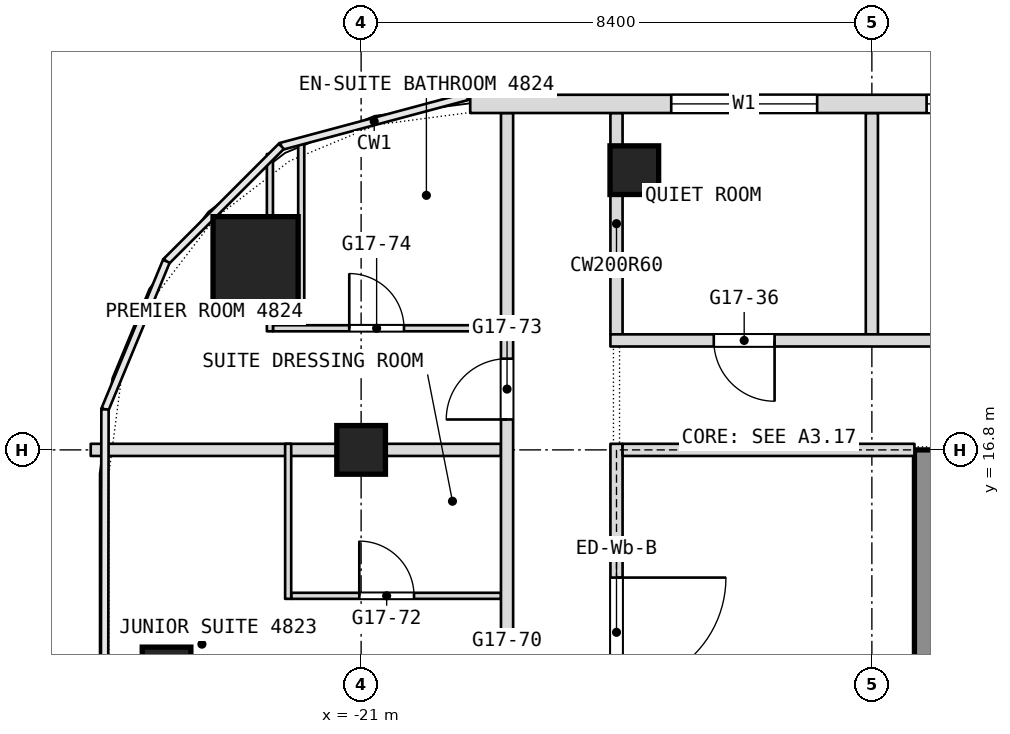
"""IFC4 building model, lengths in metres.
Left out: names, types, materials, properties, quantities, classifications, styles, units other than length and angle.
Written with IfcOpenShell. Run it as: python <this file> out.ifc"""

import sys

from ifc_helpers import new_model, si_unit, direction, frame, frame_2d, origin, origin_2d, place, context, subcontext, project, spatial, rectangle, extrude, element, fill, save


model = new_model("IFC4")
c1 = context("Model", 3, precision=1e-05, world=origin(), true_north=direction((0.0, 1.0)))
c2 = subcontext(c1, "Body", "Model", "MODEL_VIEW")
j1 = project(units=[si_unit("LENGTHUNIT", "METRE"), si_unit("PLANEANGLEUNIT", "RADIAN")], contexts=[c1])
p1 = place(None, origin())
s1 = spatial("IfcSite", under=j1, at=p1, CompositionType="ELEMENT")
p2 = place(p1, origin())
s2 = spatial("IfcBuilding", under=s1, at=p2, CompositionType="ELEMENT")
p3 = place(p2, frame((0.0, 0.0, 209.3)))
s3 = spatial("IfcBuildingStorey", under=s2, at=p3, CompositionType="ELEMENT", Elevation=209.3)
p4 = place(p3, frame((-11.5, 0.0, 0.0), z_axis=(0.0, 0.0, 1.0), x_axis=(0.0, 1.0, 0.0)))
e1 = element("IfcWall", 1, at=p4, inside=s3, PredefinedType="SHEAR", context=c2, shape_type="SweptSolid", body=[
    extrude(rectangle(XDim=16.8, YDim=0.8, at=frame_2d((8.4, 0.0))), origin(), (0.0, 0.0, 1.0), 3.6),
])
p5 = place(p4, frame((1.762, 0.0, 0.0)))
e2 = element("IfcOpeningElement", 2, at=p5, cuts=e1, PredefinedType="OPENING", context=c2, shape_type="SweptSolid", body=[
    extrude(rectangle(XDim=0.9, YDim=2.1, at=frame_2d((0.45, 1.05))), frame((0.0, 0.4, 0.0), z_axis=(0.0, -1.0, 0.0), x_axis=(1.0, 0.0, 0.0)), (0.0, 0.0, 1.0), 0.8),
])
p6 = place(p4, frame((4.387, 0.0, 0.0)))
e3 = element("IfcOpeningElement", 3, at=p6, cuts=e1, PredefinedType="OPENING", context=c2, shape_type="SweptSolid", body=[
    extrude(rectangle(XDim=0.9, YDim=2.1, at=frame_2d((0.45, 1.05))), frame((0.0, 0.4, 0.0), z_axis=(0.0, -1.0, 0.0), x_axis=(1.0, 0.0, 0.0)), (0.0, 0.0, 1.0), 0.8),
])
p7 = place(p4, frame((6.825, 0.0, 0.0)))
e4 = element("IfcOpeningElement", 4, at=p7, cuts=e1, PredefinedType="OPENING", context=c2, shape_type="SweptSolid", body=[
    extrude(rectangle(XDim=1.2, YDim=2.1, at=frame_2d((0.6, 1.05))), frame((0.0, 0.4, 0.0), z_axis=(0.0, -1.0, 0.0), x_axis=(1.0, 0.0, 0.0)), (0.0, 0.0, 1.0), 0.8),
])
p8 = place(p4, frame((12.3, 0.0, 0.0)))
e5 = element("IfcOpeningElement", 5, at=p8, cuts=e1, PredefinedType="OPENING", context=c2, shape_type="SweptSolid", body=[
    extrude(rectangle(XDim=0.9, YDim=2.1, at=frame_2d((0.45, 1.05))), frame((0.0, 0.4, 0.0), z_axis=(0.0, -1.0, 0.0), x_axis=(1.0, 0.0, 0.0)), (0.0, 0.0, 1.0), 0.8),
])
p9 = place(p4, frame((8.775, 0.0, 0.0)))
e6 = element("IfcOpeningElement", 6, at=p9, cuts=e1, PredefinedType="OPENING", context=c2, shape_type="SweptSolid", body=[
    extrude(rectangle(XDim=1.2, YDim=2.1, at=frame_2d((0.6, 1.05))), frame((0.0, 0.4, 0.0), z_axis=(0.0, -1.0, 0.0), x_axis=(1.0, 0.0, 0.0)), (0.0, 0.0, 1.0), 0.8),
])
p10 = place(p3, frame((-22.736, 19.936, 0.0), z_axis=(0.0, 0.0, 1.0), x_axis=(1.0, 0.0, 0.0)))
e7 = element("IfcColumn", 7, at=p10, inside=s3, PredefinedType="COLUMN", context=c2, shape_type="SweptSolid", body=[
    extrude(rectangle(XDim=1.4, YDim=1.4, at=origin_2d()), origin(), (0.0, 0.0, 1.0), 3.6),
])
for number, where, z_axis, x_axis in (
    (8, (-21.0, 16.8, 0.0), (0.0, 0.0, 1.0), (1.0, 0.0, 0.0)),
    (9, (-24.2, 13.156, 0.0), (0.0, 0.0, 1.0), (1.0, 0.0, 0.0)),
    (10, (-16.507, 21.4, 0.0), (0.0, 0.0, 1.0), (1.0, 0.0, 0.0)),
):
    element("IfcColumn", number, at=place(p3, frame(where, z_axis=z_axis, x_axis=x_axis)), inside=s3, PredefinedType="COLUMN", context=c2, shape_type="SweptSolid", body=[
        extrude(rectangle(XDim=0.8, YDim=0.8, at=origin_2d()), origin(), (0.0, 0.0, 1.0), 3.6),
    ])
p11 = place(p3, frame((-12.6, 18.7, 0.0), z_axis=(0.0, 0.0, 1.0), x_axis=(0.0, 1.0, 0.0)))
e11 = element("IfcWall", 11, at=p11, inside=s3, PredefinedType="PARTITIONING", context=c2, shape_type="SweptSolid", body=[
    extrude(rectangle(XDim=3.64, YDim=0.2, at=frame_2d((1.82, 0.0))), origin(), (0.0, 0.0, 1.0), 3.34),
])
p12 = place(p3, frame((-22.15, 14.4, 0.0), z_axis=(0.0, 0.0, 1.0), x_axis=(1.0, 0.0, 0.0)))
e12 = element("IfcWall", 12, at=p12, inside=s3, PredefinedType="PARTITIONING", context=c2, shape_type="SweptSolid", body=[
    extrude(rectangle(XDim=3.45, YDim=0.1, at=frame_2d((1.725, 0.0))), origin(), (0.0, 0.0, 1.0), 3.34),
])
p13 = place(p12, frame((1.12, 0.0, 0.0)))
e13 = element("IfcOpeningElement", 13, at=p13, cuts=e12, PredefinedType="OPENING", context=c2, shape_type="SweptSolid", body=[
    extrude(rectangle(XDim=0.9, YDim=2.1, at=frame_2d((0.45, 1.05))), frame((0.0, 0.05, 0.0), z_axis=(0.0, -1.0, 0.0), x_axis=(1.0, 0.0, 0.0)), (0.0, 0.0, 1.0), 0.1),
])
p14 = place(p3, frame((-16.8, 18.7, 0.0), z_axis=(0.0, 0.0, 1.0), x_axis=(0.0, 1.0, 0.0)))
e14 = element("IfcWall", 14, at=p14, inside=s3, PredefinedType="PARTITIONING", context=c2, shape_type="SweptSolid", body=[
    extrude(rectangle(XDim=3.64, YDim=0.2, at=frame_2d((1.82, 0.0))), origin(), (0.0, 0.0, 1.0), 3.34),
])
p15 = place(p3, frame((-25.447, 16.8, 0.0), z_axis=(0.0, 0.0, 1.0), x_axis=(1.0, 0.0, 0.0)))
e15 = element("IfcWall", 15, at=p15, inside=s3, PredefinedType="PARTITIONING", context=c2, shape_type="SweptSolid", body=[
    extrude(rectangle(XDim=6.747, YDim=0.2, at=frame_2d((3.374, 0.0))), origin(), (0.0, 0.0, 1.0), 2.94),
])
p16 = place(p3, frame((-18.6, -26.751, 0.0), z_axis=(0.0, 0.0, 1.0), x_axis=(0.0, 1.0, 0.0)))
e16 = element("IfcWall", 16, at=p16, inside=s3, PredefinedType="PARTITIONING", context=c2, shape_type="SweptSolid", body=[
    extrude(rectangle(XDim=49.091, YDim=0.2, at=frame_2d((24.545, 0.0))), origin(), (0.0, 0.0, 1.0), 3.34),
])
p17 = place(p16, frame((3.413, 0.0, 0.0)))
e17 = element("IfcOpeningElement", 17, at=p17, cuts=e16, PredefinedType="OPENING", context=c2, shape_type="SweptSolid", body=[
    extrude(rectangle(XDim=1.0, YDim=2.1, at=frame_2d((0.5, 1.05))), frame((0.0, 0.1, 0.0), z_axis=(0.0, -1.0, 0.0), x_axis=(1.0, 0.0, 0.0)), (0.0, 0.0, 1.0), 0.2),
])
p18 = place(p16, frame((5.838, 0.0, 0.0)))
e18 = element("IfcOpeningElement", 18, at=p18, cuts=e16, PredefinedType="OPENING", context=c2, shape_type="SweptSolid", body=[
    extrude(rectangle(XDim=1.0, YDim=2.1, at=frame_2d((0.5, 1.05))), frame((0.0, 0.1, 0.0), z_axis=(0.0, -1.0, 0.0), x_axis=(1.0, 0.0, 0.0)), (0.0, 0.0, 1.0), 0.2),
])
p19 = place(p16, frame((13.551, 0.0, 0.0)))
e19 = element("IfcOpeningElement", 19, at=p19, cuts=e16, PredefinedType="OPENING", context=c2, shape_type="SweptSolid", body=[
    extrude(rectangle(XDim=1.1, YDim=2.1, at=frame_2d((0.55, 1.05))), frame((0.0, 0.1, 0.0), z_axis=(0.0, -1.0, 0.0), x_axis=(1.0, 0.0, 0.0)), (0.0, 0.0, 1.0), 0.2),
])
p20 = place(p16, frame((21.151, 0.0, 0.0)))
e20 = element("IfcOpeningElement", 20, at=p20, cuts=e16, PredefinedType="OPENING", context=c2, shape_type="SweptSolid", body=[
    extrude(rectangle(XDim=1.0, YDim=2.1, at=frame_2d((0.5, 1.05))), frame((0.0, 0.1, 0.0), z_axis=(0.0, -1.0, 0.0), x_axis=(1.0, 0.0, 0.0)), (0.0, 0.0, 1.0), 0.2),
])
p21 = place(p16, frame((22.951, 0.0, 0.0)))
e21 = element("IfcOpeningElement", 21, at=p21, cuts=e16, PredefinedType="OPENING", context=c2, shape_type="SweptSolid", body=[
    extrude(rectangle(XDim=1.0, YDim=2.1, at=frame_2d((0.5, 1.05))), frame((0.0, 0.1, 0.0), z_axis=(0.0, -1.0, 0.0), x_axis=(1.0, 0.0, 0.0)), (0.0, 0.0, 1.0), 0.2),
])
p22 = place(p16, frame((28.301, 0.0, 0.0)))
e22 = element("IfcOpeningElement", 22, at=p22, cuts=e16, PredefinedType="OPENING", context=c2, shape_type="SweptSolid", body=[
    extrude(rectangle(XDim=1.1, YDim=2.1, at=frame_2d((0.55, 1.05))), frame((0.0, 0.1, 0.0), z_axis=(0.0, -1.0, 0.0), x_axis=(1.0, 0.0, 0.0)), (0.0, 0.0, 1.0), 0.2),
])
p23 = place(p16, frame((38.851, 0.0, 0.0)))
e23 = element("IfcOpeningElement", 23, at=p23, cuts=e16, PredefinedType="OPENING", context=c2, shape_type="SweptSolid", body=[
    extrude(rectangle(XDim=1.1, YDim=2.1, at=frame_2d((0.55, 1.05))), frame((0.0, 0.1, 0.0), z_axis=(0.0, -1.0, 0.0), x_axis=(1.0, 0.0, 0.0)), (0.0, 0.0, 1.0), 0.2),
])
p24 = place(p16, frame((44.051, 0.0, 0.0)))
e24 = element("IfcOpeningElement", 24, at=p24, cuts=e16, PredefinedType="OPENING", context=c2, shape_type="SweptSolid", body=[
    extrude(rectangle(XDim=1.0, YDim=2.1, at=frame_2d((0.5, 1.05))), frame((0.0, 0.1, 0.0), z_axis=(0.0, -1.0, 0.0), x_axis=(1.0, 0.0, 0.0)), (0.0, 0.0, 1.0), 0.2),
])
p25 = place(p3, frame((-16.9, 18.6, 0.0), z_axis=(0.0, 0.0, 1.0), x_axis=(1.0, 0.0, 0.0)))
e25 = element("IfcWall", 25, at=p25, inside=s3, PredefinedType="PARTITIONING", context=c2, shape_type="SweptSolid", body=[
    extrude(rectangle(XDim=33.8, YDim=0.2, at=frame_2d((16.9, 0.0))), origin(), (0.0, 0.0, 1.0), 3.34),
])
p26 = place(p25, frame((1.7, 0.0, 0.0)))
e26 = element("IfcOpeningElement", 26, at=p26, cuts=e25, PredefinedType="OPENING", context=c2, shape_type="SweptSolid", body=[
    extrude(rectangle(XDim=1.0, YDim=2.1, at=frame_2d((0.5, 1.05))), frame((0.0, 0.1, 0.0), z_axis=(0.0, -1.0, 0.0), x_axis=(1.0, 0.0, 0.0)), (0.0, 0.0, 1.0), 0.2),
])
p27 = place(p25, frame((7.6, 0.0, 0.0)))
e27 = element("IfcOpeningElement", 27, at=p27, cuts=e25, PredefinedType="OPENING", context=c2, shape_type="SweptSolid", body=[
    extrude(rectangle(XDim=1.8, YDim=2.1, at=frame_2d((0.9, 1.05))), frame((0.0, 0.1, 0.0), z_axis=(0.0, -1.0, 0.0), x_axis=(1.0, 0.0, 0.0)), (0.0, 0.0, 1.0), 0.2),
])
p28 = place(p25, frame((16.0, 0.0, 0.0)))
e28 = element("IfcOpeningElement", 28, at=p28, cuts=e25, PredefinedType="OPENING", context=c2, shape_type="SweptSolid", body=[
    extrude(rectangle(XDim=1.8, YDim=2.1, at=frame_2d((0.9, 1.05))), frame((0.0, 0.1, 0.0), z_axis=(0.0, -1.0, 0.0), x_axis=(1.0, 0.0, 0.0)), (0.0, 0.0, 1.0), 0.2),
])
p29 = place(p25, frame((24.4, 0.0, 0.0)))
e29 = element("IfcOpeningElement", 29, at=p29, cuts=e25, PredefinedType="OPENING", context=c2, shape_type="SweptSolid", body=[
    extrude(rectangle(XDim=1.8, YDim=2.1, at=frame_2d((0.9, 1.05))), frame((0.0, 0.1, 0.0), z_axis=(0.0, -1.0, 0.0), x_axis=(1.0, 0.0, 0.0)), (0.0, 0.0, 1.0), 0.2),
])
p30 = place(p25, frame((31.1, 0.0, 0.0)))
e30 = element("IfcOpeningElement", 30, at=p30, cuts=e25, PredefinedType="OPENING", context=c2, shape_type="SweptSolid", body=[
    extrude(rectangle(XDim=1.0, YDim=2.1, at=frame_2d((0.5, 1.05))), frame((0.0, 0.1, 0.0), z_axis=(0.0, -1.0, 0.0), x_axis=(1.0, 0.0, 0.0)), (0.0, 0.0, 1.0), 0.2),
])
p31 = place(p3, frame((-22.45, 18.8, 0.0), z_axis=(0.0, 0.0, 1.0), x_axis=(1.0, 0.0, 0.0)))
e31 = element("IfcWall", 31, at=p31, inside=s3, PredefinedType="PARTITIONING", context=c2, shape_type="SweptSolid", body=[
    extrude(rectangle(XDim=3.75, YDim=0.1, at=frame_2d((1.875, 0.0))), origin(), (0.0, 0.0, 1.0), 3.34),
])
p32 = place(p31, frame((1.255, 0.0, 0.0)))
e32 = element("IfcOpeningElement", 32, at=p32, cuts=e31, PredefinedType="OPENING", context=c2, shape_type="SweptSolid", body=[
    extrude(rectangle(XDim=0.9, YDim=2.1, at=frame_2d((0.45, 1.05))), frame((0.0, 0.05, 0.0), z_axis=(0.0, -1.0, 0.0), x_axis=(1.0, 0.0, 0.0)), (0.0, 0.0, 1.0), 0.1),
])
p33 = place(p3, frame((-22.2, 14.35, 0.0), z_axis=(0.0, 0.0, 1.0), x_axis=(0.0, 1.0, 0.0)))
e33 = element("IfcWall", 33, at=p33, inside=s3, PredefinedType="PARTITIONING", context=c2, shape_type="SweptSolid", body=[
    extrude(rectangle(XDim=2.55, YDim=0.1, at=frame_2d((1.275, 0.0))), origin(), (0.0, 0.0, 1.0), 3.34),
])
p34 = place(p3, frame((-22.5, 18.75, 0.0), z_axis=(0.0, 0.0, 1.0), x_axis=(0.0, 1.0, 0.0)))
e34 = element("IfcWall", 34, at=p34, inside=s3, PredefinedType="PARTITIONING", context=c2, shape_type="SweptSolid", body=[
    extrude(rectangle(XDim=0.486, YDim=0.1, at=frame_2d((0.243, 0.0))), origin(), (0.0, 0.0, 1.0), 3.34),
])
p35 = place(p3, frame((-22.5, 20.636, 0.0), z_axis=(0.0, 0.0, 1.0), x_axis=(0.0, 1.0, 0.0)))
e35 = element("IfcWall", 35, at=p35, inside=s3, PredefinedType="PARTITIONING", context=c2, shape_type="SweptSolid", body=[
    extrude(rectangle(XDim=1.03, YDim=0.1, at=frame_2d((0.515, 0.0))), origin(), (0.0, 0.0, 1.0), 3.34),
])
p36 = place(p3, frame((-21.985, 19.236, 0.0), z_axis=(0.0, 0.0, 1.0), x_axis=(0.0, 1.0, 0.0)))
e36 = element("IfcWall", 36, at=p36, inside=s3, PredefinedType="PARTITIONING", context=c2, shape_type="SweptSolid", body=[
    extrude(rectangle(XDim=2.614, YDim=0.1, at=frame_2d((1.307, 0.0))), origin(), (0.0, 0.0, 1.0), 3.34),
])
p37 = place(p3, frame((19.206, 22.49, 0.0), z_axis=(0.0, 0.0, 1.0), x_axis=(-1.0, 0.0, 0.0)))
e37 = element("IfcWall", 37, at=p37, inside=s3, PredefinedType="NOTDEFINED", context=c2, shape_type="SweptSolid", body=[
    extrude(rectangle(XDim=38.412, YDim=0.3, at=frame_2d((19.206, 0.0))), origin(), (0.0, 0.0, 1.0), 3.6),
])
p38 = place(p37, frame((3.306, 0.0, 0.9)))
e38 = element("IfcOpeningElement", 38, at=p38, cuts=e37, PredefinedType="OPENING", context=c2, shape_type="SweptSolid", body=[
    extrude(rectangle(XDim=2.4, YDim=2.1, at=frame_2d((1.2, 1.05))), frame((0.0, 0.15, 0.0), z_axis=(0.0, -1.0, 0.0), x_axis=(1.0, 0.0, 0.0)), (0.0, 0.0, 1.0), 0.3),
])
p39 = place(p37, frame((7.506, 0.0, 0.9)))
e39 = element("IfcOpeningElement", 39, at=p39, cuts=e37, PredefinedType="OPENING", context=c2, shape_type="SweptSolid", body=[
    extrude(rectangle(XDim=2.4, YDim=2.1, at=frame_2d((1.2, 1.05))), frame((0.0, 0.15, 0.0), z_axis=(0.0, -1.0, 0.0), x_axis=(1.0, 0.0, 0.0)), (0.0, 0.0, 1.0), 0.3),
])
p40 = place(p37, frame((11.706, 0.0, 0.9)))
e40 = element("IfcOpeningElement", 40, at=p40, cuts=e37, PredefinedType="OPENING", context=c2, shape_type="SweptSolid", body=[
    extrude(rectangle(XDim=2.4, YDim=2.1, at=frame_2d((1.2, 1.05))), frame((0.0, 0.15, 0.0), z_axis=(0.0, -1.0, 0.0), x_axis=(1.0, 0.0, 0.0)), (0.0, 0.0, 1.0), 0.3),
])
p41 = place(p37, frame((15.906, 0.0, 0.9)))
e41 = element("IfcOpeningElement", 41, at=p41, cuts=e37, PredefinedType="OPENING", context=c2, shape_type="SweptSolid", body=[
    extrude(rectangle(XDim=2.4, YDim=2.1, at=frame_2d((1.2, 1.05))), frame((0.0, 0.15, 0.0), z_axis=(0.0, -1.0, 0.0), x_axis=(1.0, 0.0, 0.0)), (0.0, 0.0, 1.0), 0.3),
])
p42 = place(p37, frame((20.106, 0.0, 0.9)))
e42 = element("IfcOpeningElement", 42, at=p42, cuts=e37, PredefinedType="OPENING", context=c2, shape_type="SweptSolid", body=[
    extrude(rectangle(XDim=2.4, YDim=2.1, at=frame_2d((1.2, 1.05))), frame((0.0, 0.15, 0.0), z_axis=(0.0, -1.0, 0.0), x_axis=(1.0, 0.0, 0.0)), (0.0, 0.0, 1.0), 0.3),
])
p43 = place(p37, frame((24.306, 0.0, 0.9)))
e43 = element("IfcOpeningElement", 43, at=p43, cuts=e37, PredefinedType="OPENING", context=c2, shape_type="SweptSolid", body=[
    extrude(rectangle(XDim=2.4, YDim=2.1, at=frame_2d((1.2, 1.05))), frame((0.0, 0.15, 0.0), z_axis=(0.0, -1.0, 0.0), x_axis=(1.0, 0.0, 0.0)), (0.0, 0.0, 1.0), 0.3),
])
p44 = place(p37, frame((28.506, 0.0, 0.9)))
e44 = element("IfcOpeningElement", 44, at=p44, cuts=e37, PredefinedType="OPENING", context=c2, shape_type="SweptSolid", body=[
    extrude(rectangle(XDim=2.4, YDim=2.1, at=frame_2d((1.2, 1.05))), frame((0.0, 0.15, 0.0), z_axis=(0.0, -1.0, 0.0), x_axis=(1.0, 0.0, 0.0)), (0.0, 0.0, 1.0), 0.3),
])
p45 = place(p37, frame((32.706, 0.0, 0.9)))
e45 = element("IfcOpeningElement", 45, at=p45, cuts=e37, PredefinedType="OPENING", context=c2, shape_type="SweptSolid", body=[
    extrude(rectangle(XDim=2.4, YDim=2.1, at=frame_2d((1.2, 1.05))), frame((0.0, 0.15, 0.0), z_axis=(0.0, -1.0, 0.0), x_axis=(1.0, 0.0, 0.0)), (0.0, 0.0, 1.0), 0.3),
])
p46 = place(p3, frame((-16.8, -0.1, 0.0), z_axis=(0.0, 0.0, 1.0), x_axis=(0.0, 1.0, 0.0)))
e46 = element("IfcWall", 46, at=p46, inside=s3, PredefinedType="PARTITIONING", context=c2, shape_type="SweptSolid", body=[
    extrude(rectangle(XDim=17.0, YDim=0.2, at=frame_2d((8.5, 0.0))), origin(), (0.0, 0.0, 1.0), 3.34),
])
p47 = place(p46, frame((2.2, 0.0, 0.0)))
e47 = element("IfcOpeningElement", 47, at=p47, cuts=e46, PredefinedType="OPENING", context=c2, shape_type="SweptSolid", body=[
    extrude(rectangle(XDim=1.8, YDim=2.1, at=frame_2d((0.9, 1.05))), frame((0.0, 0.1, 0.0), z_axis=(0.0, -1.0, 0.0), x_axis=(1.0, 0.0, 0.0)), (0.0, 0.0, 1.0), 0.2),
])
p48 = place(p46, frame((13.0, 0.0, 0.0)))
e48 = element("IfcOpeningElement", 48, at=p48, cuts=e46, PredefinedType="OPENING", context=c2, shape_type="SweptSolid", body=[
    extrude(rectangle(XDim=1.8, YDim=2.1, at=frame_2d((0.9, 1.05))), frame((0.0, 0.1, 0.0), z_axis=(0.0, -1.0, 0.0), x_axis=(1.0, 0.0, 0.0)), (0.0, 0.0, 1.0), 0.2),
])
p49 = place(p3, frame((-16.7, 16.8, 0.0), z_axis=(0.0, 0.0, 1.0), x_axis=(1.0, 0.0, 0.0)))
e49 = element("IfcWall", 49, at=p49, inside=s3, PredefinedType="PARTITIONING", context=c2, shape_type="SweptSolid", body=[
    extrude(rectangle(XDim=4.8, YDim=0.2, at=frame_2d((2.4, 0.0))), origin(), (0.0, 0.0, 1.0), 2.94),
])
p50 = place(p13, origin())
e50 = element("IfcDoor", 50, at=p50, inside=s3, OperationType="SINGLE_SWING_LEFT", PredefinedType="DOOR", context=c2, shape_type="SweptSolid", body=[
    extrude(rectangle(XDim=0.9, YDim=2.1, at=frame_2d((0.45, 1.05))), frame((0.0, 0.025, 0.0), z_axis=(0.0, -1.0, 0.0), x_axis=(1.0, 0.0, 0.0)), (0.0, 0.0, 1.0), 0.05),
])
fill(e13, e50)
p51 = place(p24, origin())
e51 = element("IfcDoor", 51, at=p51, inside=s3, OperationType="SINGLE_SWING_RIGHT", PredefinedType="DOOR", context=c2, shape_type="SweptSolid", body=[
    extrude(rectangle(XDim=1.0, YDim=2.1, at=frame_2d((0.5, 1.05))), frame((0.0, 0.025, 0.0), z_axis=(0.0, -1.0, 0.0), x_axis=(1.0, 0.0, 0.0)), (0.0, 0.0, 1.0), 0.05),
])
fill(e24, e51)
p52 = place(p26, origin())
e52 = element("IfcDoor", 52, at=p52, inside=s3, OperationType="SINGLE_SWING_RIGHT", PredefinedType="DOOR", context=c2, shape_type="SweptSolid", body=[
    extrude(rectangle(XDim=1.0, YDim=2.1, at=frame_2d((0.5, 1.05))), frame((0.0, 0.025, 0.0), z_axis=(0.0, -1.0, 0.0), x_axis=(1.0, 0.0, 0.0)), (0.0, 0.0, 1.0), 0.05),
])
fill(e26, e52)
p53 = place(p32, origin())
e53 = element("IfcDoor", 53, at=p53, inside=s3, OperationType="SINGLE_SWING_LEFT", PredefinedType="DOOR", context=c2, shape_type="SweptSolid", body=[
    extrude(rectangle(XDim=0.9, YDim=2.1, at=frame_2d((0.45, 1.05))), frame((0.0, 0.025, 0.0), z_axis=(0.0, -1.0, 0.0), x_axis=(1.0, 0.0, 0.0)), (0.0, 0.0, 1.0), 0.05),
])
fill(e32, e53)
p54 = place(p44, origin())
e54 = element("IfcWindow", 54, at=p54, inside=s3, PartitioningType="SINGLE_PANEL", PredefinedType="WINDOW", context=c2, shape_type="SweptSolid", body=[
    extrude(rectangle(XDim=2.4, YDim=2.1, at=frame_2d((1.2, 1.05))), frame((0.0, 0.03, 0.0), z_axis=(0.0, -1.0, 0.0), x_axis=(1.0, 0.0, 0.0)), (0.0, 0.0, 1.0), 0.06),
])
fill(e44, e54)
p55 = place(p45, origin())
e55 = element("IfcWindow", 55, at=p55, inside=s3, PartitioningType="SINGLE_PANEL", PredefinedType="WINDOW", context=c2, shape_type="SweptSolid", body=[
    extrude(rectangle(XDim=2.4, YDim=2.1, at=frame_2d((1.2, 1.05))), frame((0.0, 0.03, 0.0), z_axis=(0.0, -1.0, 0.0), x_axis=(1.0, 0.0, 0.0)), (0.0, 0.0, 1.0), 0.06),
])
fill(e45, e55)
p56 = place(p48, origin())
e56 = element("IfcDoor", 56, at=p56, inside=s3, OperationType="DOUBLE_DOOR_SINGLE_SWING", PredefinedType="DOOR", context=c2, shape_type="SweptSolid", body=[
    extrude(rectangle(XDim=1.8, YDim=2.1, at=frame_2d((0.9, 1.05))), frame((0.0, 0.025, 0.0), z_axis=(0.0, -1.0, 0.0), x_axis=(1.0, 0.0, 0.0)), (0.0, 0.0, 1.0), 0.05),
])
fill(e48, e56)
save(model, sys.argv[1])
